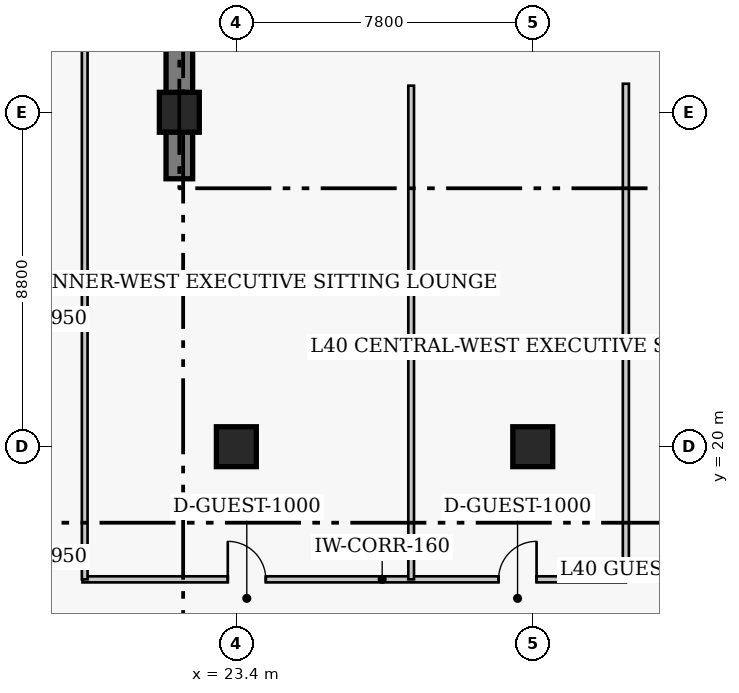
"""IFC4 building model, lengths in metres.
Left out: names, types, materials, properties, quantities, classifications, styles, units other than length and angle.
Written with IfcOpenShell. Run it as: python <this file> out.ifc"""

import sys

from ifc_helpers import new_model, si_unit, direction, frame, frame_2d, origin, origin_2d, place, context, subcontext, project, spatial, rectangle, extrude, element, fill, save


model = new_model("IFC4")
c1 = context("Model", 3, precision=1e-05, world=origin(), true_north=direction((0.0, 1.0)))
c2 = subcontext(c1, "Body", "Model", "MODEL_VIEW")
j1 = project(units=[si_unit("LENGTHUNIT", "METRE"), si_unit("PLANEANGLEUNIT", "RADIAN")], contexts=[c1])
p1 = place(None, origin())
s1 = spatial("IfcSite", under=j1, at=p1, CompositionType="ELEMENT")
p2 = place(p1, origin())
s2 = spatial("IfcBuilding", under=s1, at=p2, CompositionType="ELEMENT")
p3 = place(p2, frame((0.0, 0.0, 161.2)))
s3 = spatial("IfcBuildingStorey", under=s2, at=p3, CompositionType="ELEMENT", Elevation=161.2)
p4 = place(p3, frame((21.9, 27.05, 0.0), z_axis=(0.0, 0.0, 1.0), x_axis=(0.0, 1.0, 0.0)))
e1 = element("IfcWall", 1, at=p4, inside=s3, PredefinedType="SHEAR", context=c2, shape_type="SweptSolid", body=[
    extrude(rectangle(XDim=13.62, YDim=0.7, at=frame_2d((6.81, 0.0))), origin(), (0.0, 0.0, 1.0), 3.8),
])
for number, where, z_axis, x_axis in (
    (2, (23.4, 20.0, 0.0), (0.0, 0.0, 1.0), (1.0, 0.0, 0.0)),
    (3, (31.2, 20.0, 0.0), (0.0, 0.0, 1.0), (1.0, 0.0, 0.0)),
    (4, (21.9, 28.8, 0.0), (0.0, 0.0, 1.0), (1.0, 0.0, 0.0)),
):
    element("IfcColumn", number, at=place(p3, frame(where, z_axis=z_axis, x_axis=x_axis)), inside=s3, PredefinedType="COLUMN", context=c2, shape_type="SweptSolid", body=[
        extrude(rectangle(XDim=1.05, YDim=1.05, at=origin_2d()), origin(), (0.0, 0.0, 1.0), 3.8),
    ])
p5 = place(p3, frame((19.35, 16.51, 0.0), z_axis=(0.0, 0.0, 1.0), x_axis=(1.0, 0.0, 0.0)))
e5 = element("IfcWall", 5, at=p5, inside=s3, PredefinedType="PARTITIONING", context=c2, shape_type="SweptSolid", body=[
    extrude(rectangle(XDim=14.3, YDim=0.16, at=frame_2d((7.15, 0.0))), origin(), (0.0, 0.0, 1.0), 3.55),
])
p6 = place(p5, frame((3.825, 0.0, 0.0)))
e6 = element("IfcOpeningElement", 6, at=p6, cuts=e5, PredefinedType="OPENING", context=c2, shape_type="SweptSolid", body=[
    extrude(rectangle(XDim=1.0, YDim=2.15, at=frame_2d((0.5, 1.075))), frame((0.0, 0.09, 0.0), z_axis=(0.0, -1.0, 0.0), x_axis=(1.0, 0.0, 0.0)), (0.0, 0.0, 1.0), 0.18),
])
p7 = place(p5, frame((10.95, 0.0, 0.0)))
e7 = element("IfcOpeningElement", 7, at=p7, cuts=e5, PredefinedType="OPENING", context=c2, shape_type="SweptSolid", body=[
    extrude(rectangle(XDim=1.0, YDim=2.15, at=frame_2d((0.5, 1.075))), frame((0.0, 0.09, 0.0), z_axis=(0.0, -1.0, 0.0), x_axis=(1.0, 0.0, 0.0)), (0.0, 0.0, 1.0), 0.18),
])
p8 = place(p3, frame((33.65, 16.51, 0.0), z_axis=(0.0, 0.0, 1.0), x_axis=(0.0, 1.0, 0.0)))
e8 = element("IfcWall", 8, at=p8, inside=s3, PredefinedType="PARTITIONING", context=c2, shape_type="SweptSolid", body=[
    extrude(rectangle(XDim=13.04, YDim=0.16, at=frame_2d((6.52, 0.0))), origin(), (0.0, 0.0, 1.0), 3.55),
])
p9 = place(p3, frame((19.41, 16.51, 0.0), z_axis=(0.0, 0.0, 1.0), x_axis=(0.0, 1.0, 0.0)))
e9 = element("IfcWall", 9, at=p9, inside=s3, PredefinedType="PARTITIONING", context=c2, shape_type="SweptSolid", body=[
    extrude(rectangle(XDim=16.29, YDim=0.15, at=frame_2d((8.145, 0.0))), origin(), (0.0, 0.0, 1.0), 3.093),
])
p10 = place(p3, frame((28.0, 16.51, 0.0), z_axis=(0.0, 0.0, 1.0), x_axis=(0.0, 1.0, 0.0)))
e10 = element("IfcWall", 10, at=p10, inside=s3, PredefinedType="PARTITIONING", context=c2, shape_type="SweptSolid", body=[
    extrude(rectangle(XDim=12.99, YDim=0.15, at=frame_2d((6.495, 0.0))), origin(), (0.0, 0.0, 1.0), 3.55),
])
p11 = place(p6, origin())
e11 = element("IfcDoor", 11, at=p11, inside=s3, OperationType="SINGLE_SWING_LEFT", PredefinedType="DOOR", context=c2, shape_type="SweptSolid", body=[
    extrude(rectangle(XDim=1.0, YDim=2.15, at=frame_2d((0.5, 1.075))), frame((0.0, 0.025, 0.0), z_axis=(0.0, -1.0, 0.0), x_axis=(1.0, 0.0, 0.0)), (0.0, 0.0, 1.0), 0.05),
])
fill(e6, e11)
p12 = place(p7, origin())
e12 = element("IfcDoor", 12, at=p12, inside=s3, OperationType="SINGLE_SWING_RIGHT", PredefinedType="DOOR", context=c2, shape_type="SweptSolid", body=[
    extrude(rectangle(XDim=1.0, YDim=2.15, at=frame_2d((0.5, 1.075))), frame((0.0, 0.025, 0.0), z_axis=(0.0, -1.0, 0.0), x_axis=(1.0, 0.0, 0.0)), (0.0, 0.0, 1.0), 0.05),
])
fill(e7, e12)
save(model, sys.argv[1])
